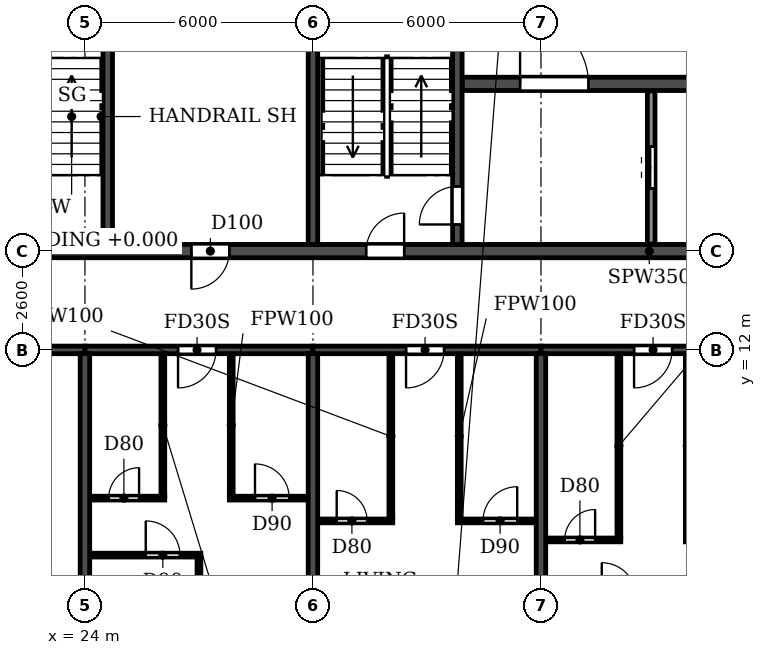
"""IFC4 building model, lengths in metres.
Left out: names, types, materials, properties, quantities, classifications, styles, units other than length and angle.
Written with IfcOpenShell. Run it as: python <this file> out.ifc"""

import sys

from ifc_helpers import new_model, si_unit, direction, frame, frame_2d, origin, place, context, subcontext, project, spatial, rectangle, extrude, element, fill, save


model = new_model("IFC4")
c1 = context("Model", 3, precision=1e-05, world=origin(), true_north=direction((0.0, 1.0)))
c2 = subcontext(c1, "Body", "Model", "MODEL_VIEW")
j1 = project(units=[si_unit("LENGTHUNIT", "METRE"), si_unit("PLANEANGLEUNIT", "RADIAN")], contexts=[c1])
p1 = place(None, origin())
s1 = spatial("IfcSite", under=j1, at=p1, CompositionType="ELEMENT")
p2 = place(p1, origin())
s2 = spatial("IfcBuilding", under=s1, at=p2, CompositionType="ELEMENT")
p3 = place(p2, frame((0.0, 0.0, 221.4)))
s3 = spatial("IfcBuildingStorey", under=s2, at=p3, CompositionType="ELEMENT", Elevation=221.4)
for number, where, z_axis, x_axis in (
    (1, (24.0, 0.2, 0.0), (0.0, 0.0, 1.0), (0.0, 1.0, 0.0)),
    (2, (30.0, 0.2, 0.0), (0.0, 0.0, 1.0), (0.0, 1.0, 0.0)),
    (3, (36.0, 0.2, 0.0), (0.0, 0.0, 1.0), (0.0, 1.0, 0.0)),
):
    element("IfcWall", number, at=place(p3, frame(where, z_axis=z_axis, x_axis=x_axis)), inside=s3, PredefinedType="SHEAR", context=c2, shape_type="SweptSolid", body=[
        extrude(rectangle(XDim=11.7, YDim=0.25, at=frame_2d((5.85, 0.0))), origin(), (0.0, 0.0, 1.0), 3.08),
    ])
p4 = place(p3, frame((18.2, 12.0, 0.0), z_axis=(0.0, 0.0, 1.0), x_axis=(1.0, 0.0, 0.0)))
e4 = element("IfcWall", 4, at=p4, inside=s3, PredefinedType="SHEAR", context=c2, shape_type="SweptSolid", body=[
    extrude(rectangle(XDim=5.8, YDim=0.2, at=frame_2d((2.9, 0.0))), origin(), (0.0, 0.0, 1.0), 2.48),
])
p5 = place(p4, frame((2.3, 0.0, 0.0)))
e5 = element("IfcOpeningElement", 5, at=p5, cuts=e4, PredefinedType="OPENING", context=c2, shape_type="SweptSolid", body=[
    extrude(rectangle(XDim=1.0, YDim=2.1, at=frame_2d((0.5, 1.05))), frame((0.0, 0.11, 0.0), z_axis=(0.0, -1.0, 0.0), x_axis=(1.0, 0.0, 0.0)), (0.0, 0.0, 1.0), 0.22),
])
p6 = place(p3, frame((24.0, 12.0, 0.0), z_axis=(0.0, 0.0, 1.0), x_axis=(1.0, 0.0, 0.0)))
e6 = element("IfcWall", 6, at=p6, inside=s3, PredefinedType="SHEAR", context=c2, shape_type="SweptSolid", body=[
    extrude(rectangle(XDim=6.0, YDim=0.2, at=frame_2d((3.0, 0.0))), origin(), (0.0, 0.0, 1.0), 2.48),
])
p7 = place(p6, frame((2.45, 0.0, 0.0)))
e7 = element("IfcOpeningElement", 7, at=p7, cuts=e6, PredefinedType="OPENING", context=c2, shape_type="SweptSolid", body=[
    extrude(rectangle(XDim=1.0, YDim=2.1, at=frame_2d((0.5, 1.05))), frame((0.0, 0.11, 0.0), z_axis=(0.0, -1.0, 0.0), x_axis=(1.0, 0.0, 0.0)), (0.0, 0.0, 1.0), 0.22),
])
p8 = place(p3, frame((30.0, 12.0, 0.0), z_axis=(0.0, 0.0, 1.0), x_axis=(1.0, 0.0, 0.0)))
e8 = element("IfcWall", 8, at=p8, inside=s3, PredefinedType="SHEAR", context=c2, shape_type="SweptSolid", body=[
    extrude(rectangle(XDim=6.0, YDim=0.2, at=frame_2d((3.0, 0.0))), origin(), (0.0, 0.0, 1.0), 2.48),
])
p9 = place(p8, frame((2.45, 0.0, 0.0)))
e9 = element("IfcOpeningElement", 9, at=p9, cuts=e8, PredefinedType="OPENING", context=c2, shape_type="SweptSolid", body=[
    extrude(rectangle(XDim=1.0, YDim=2.1, at=frame_2d((0.5, 1.05))), frame((0.0, 0.11, 0.0), z_axis=(0.0, -1.0, 0.0), x_axis=(1.0, 0.0, 0.0)), (0.0, 0.0, 1.0), 0.22),
])
p10 = place(p3, frame((36.0, 12.0, 0.0), z_axis=(0.0, 0.0, 1.0), x_axis=(1.0, 0.0, 0.0)))
e10 = element("IfcWall", 10, at=p10, inside=s3, PredefinedType="SHEAR", context=c2, shape_type="SweptSolid", body=[
    extrude(rectangle(XDim=6.0, YDim=0.2, at=frame_2d((3.0, 0.0))), origin(), (0.0, 0.0, 1.0), 2.48),
])
p11 = place(p10, frame((2.45, 0.0, 0.0)))
e11 = element("IfcOpeningElement", 11, at=p11, cuts=e10, PredefinedType="OPENING", context=c2, shape_type="SweptSolid", body=[
    extrude(rectangle(XDim=1.0, YDim=2.1, at=frame_2d((0.5, 1.05))), frame((0.0, 0.11, 0.0), z_axis=(0.0, -1.0, 0.0), x_axis=(1.0, 0.0, 0.0)), (0.0, 0.0, 1.0), 0.22),
])
p12 = place(p3, frame((18.2, 14.6, 0.0), z_axis=(0.0, 0.0, 1.0), x_axis=(1.0, 0.0, 0.0)))
e12 = element("IfcWall", 12, at=p12, inside=s3, PredefinedType="SOLIDWALL", context=c2, shape_type="SweptSolid", body=[
    extrude(rectangle(XDim=65.6, YDim=0.35, at=frame_2d((32.8, 0.0))), origin(), (0.0, 0.0, 1.0), 3.08),
])
p13 = place(p12, frame((0.7, 0.0, 0.0)))
e13 = element("IfcOpeningElement", 13, at=p13, cuts=e12, PredefinedType="OPENING", context=c2, shape_type="SweptSolid", body=[
    extrude(rectangle(XDim=1.0, YDim=2.1, at=frame_2d((0.5, 1.05))), frame((0.0, 0.185, 0.0), z_axis=(0.0, -1.0, 0.0), x_axis=(1.0, 0.0, 0.0)), (0.0, 0.0, 1.0), 0.37),
])
p14 = place(p12, frame((8.6, 0.0, 0.0)))
e14 = element("IfcOpeningElement", 14, at=p14, cuts=e12, PredefinedType="OPENING", context=c2, shape_type="SweptSolid", body=[
    extrude(rectangle(XDim=1.0, YDim=2.1, at=frame_2d((0.5, 1.05))), frame((0.0, 0.185, 0.0), z_axis=(0.0, -1.0, 0.0), x_axis=(1.0, 0.0, 0.0)), (0.0, 0.0, 1.0), 0.37),
])
p15 = place(p12, frame((13.2, 0.0, 0.0)))
e15 = element("IfcOpeningElement", 15, at=p15, cuts=e12, PredefinedType="OPENING", context=c2, shape_type="SweptSolid", body=[
    extrude(rectangle(XDim=1.0, YDim=2.1, at=frame_2d((0.5, 1.05))), frame((0.0, 0.185, 0.0), z_axis=(0.0, -1.0, 0.0), x_axis=(1.0, 0.0, 0.0)), (0.0, 0.0, 1.0), 0.37),
])
p16 = place(p12, frame((27.1, 0.0, 0.0)))
e16 = element("IfcOpeningElement", 16, at=p16, cuts=e12, PredefinedType="OPENING", context=c2, shape_type="SweptSolid", body=[
    extrude(rectangle(XDim=1.0, YDim=2.1, at=frame_2d((0.5, 1.05))), frame((0.0, 0.185, 0.0), z_axis=(0.0, -1.0, 0.0), x_axis=(1.0, 0.0, 0.0)), (0.0, 0.0, 1.0), 0.37),
])
p17 = place(p12, frame((32.3, 0.0, 0.0)))
e17 = element("IfcOpeningElement", 17, at=p17, cuts=e12, PredefinedType="OPENING", context=c2, shape_type="SweptSolid", body=[
    extrude(rectangle(XDim=1.0, YDim=2.1, at=frame_2d((0.5, 1.05))), frame((0.0, 0.185, 0.0), z_axis=(0.0, -1.0, 0.0), x_axis=(1.0, 0.0, 0.0)), (0.0, 0.0, 1.0), 0.37),
])
p18 = place(p12, frame((35.95, 0.0, 0.0)))
e18 = element("IfcOpeningElement", 18, at=p18, cuts=e12, PredefinedType="OPENING", context=c2, shape_type="SweptSolid", body=[
    extrude(rectangle(XDim=1.5, YDim=2.1, at=frame_2d((0.75, 1.05))), frame((0.0, 0.185, 0.0), z_axis=(0.0, -1.0, 0.0), x_axis=(1.0, 0.0, 0.0)), (0.0, 0.0, 1.0), 0.37),
])
p19 = place(p12, frame((40.1, 0.0, 0.0)))
e19 = element("IfcOpeningElement", 19, at=p19, cuts=e12, PredefinedType="OPENING", context=c2, shape_type="SweptSolid", body=[
    extrude(rectangle(XDim=1.0, YDim=2.1, at=frame_2d((0.5, 1.05))), frame((0.0, 0.185, 0.0), z_axis=(0.0, -1.0, 0.0), x_axis=(1.0, 0.0, 0.0)), (0.0, 0.0, 1.0), 0.37),
])
p20 = place(p12, frame((51.4, 0.0, 0.0)))
e20 = element("IfcOpeningElement", 20, at=p20, cuts=e12, PredefinedType="OPENING", context=c2, shape_type="SweptSolid", body=[
    extrude(rectangle(XDim=1.0, YDim=2.1, at=frame_2d((0.5, 1.05))), frame((0.0, 0.185, 0.0), z_axis=(0.0, -1.0, 0.0), x_axis=(1.0, 0.0, 0.0)), (0.0, 0.0, 1.0), 0.37),
])
p21 = place(p12, frame((56.0, 0.0, 0.0)))
e21 = element("IfcOpeningElement", 21, at=p21, cuts=e12, PredefinedType="OPENING", context=c2, shape_type="SweptSolid", body=[
    extrude(rectangle(XDim=1.0, YDim=2.1, at=frame_2d((0.5, 1.05))), frame((0.0, 0.185, 0.0), z_axis=(0.0, -1.0, 0.0), x_axis=(1.0, 0.0, 0.0)), (0.0, 0.0, 1.0), 0.37),
])
p22 = place(p12, frame((63.9, 0.0, 0.0)))
e22 = element("IfcOpeningElement", 22, at=p22, cuts=e12, PredefinedType="OPENING", context=c2, shape_type="SweptSolid", body=[
    extrude(rectangle(XDim=1.0, YDim=2.1, at=frame_2d((0.5, 1.05))), frame((0.0, 0.185, 0.0), z_axis=(0.0, -1.0, 0.0), x_axis=(1.0, 0.0, 0.0)), (0.0, 0.0, 1.0), 0.37),
])
p23 = place(p3, frame((33.925, 19.0, 0.0), z_axis=(0.0, 0.0, 1.0), x_axis=(1.0, 0.0, 0.0)))
e23 = element("IfcWall", 23, at=p23, inside=s3, PredefinedType="SOLIDWALL", context=c2, shape_type="SweptSolid", body=[
    extrude(rectangle(XDim=34.15, YDim=0.35, at=frame_2d((17.075, 0.0))), origin(), (0.0, 0.0, 1.0), 3.08),
])
p24 = place(p23, frame((16.175, 0.0, 0.0)))
e24 = element("IfcOpeningElement", 24, at=p24, cuts=e23, PredefinedType="OPENING", context=c2, shape_type="SweptSolid", body=[
    extrude(rectangle(XDim=1.8, YDim=2.1, at=frame_2d((0.9, 1.05))), frame((0.0, 0.185, 0.0), z_axis=(0.0, -1.0, 0.0), x_axis=(1.0, 0.0, 0.0)), (0.0, 0.0, 1.0), 0.37),
])
p25 = place(p23, frame((1.525, 0.0, 0.0)))
e25 = element("IfcOpeningElement", 25, at=p25, cuts=e23, PredefinedType="OPENING", context=c2, shape_type="SweptSolid", body=[
    extrude(rectangle(XDim=1.8, YDim=2.1, at=frame_2d((0.9, 1.05))), frame((0.0, 0.185, 0.0), z_axis=(0.0, -1.0, 0.0), x_axis=(1.0, 0.0, 0.0)), (0.0, 0.0, 1.0), 0.37),
])
p26 = place(p23, frame((30.825, 0.0, 0.0)))
e26 = element("IfcOpeningElement", 26, at=p26, cuts=e23, PredefinedType="OPENING", context=c2, shape_type="SweptSolid", body=[
    extrude(rectangle(XDim=1.8, YDim=2.1, at=frame_2d((0.9, 1.05))), frame((0.0, 0.185, 0.0), z_axis=(0.0, -1.0, 0.0), x_axis=(1.0, 0.0, 0.0)), (0.0, 0.0, 1.0), 0.37),
])
p27 = place(p3, frame((30.0, 14.775, 0.0), z_axis=(0.0, 0.0, 1.0), x_axis=(0.0, 1.0, 0.0)))
e27 = element("IfcWall", 27, at=p27, inside=s3, PredefinedType="SOLIDWALL", context=c2, shape_type="SweptSolid", body=[
    extrude(rectangle(XDim=7.7, YDim=0.25, at=frame_2d((3.85, 0.0))), origin(), (0.0, 0.0, 1.0), 3.08),
])
p28 = place(p3, frame((33.8, 14.775, 0.0), z_axis=(0.0, 0.0, 1.0), x_axis=(0.0, 1.0, 0.0)))
e28 = element("IfcWall", 28, at=p28, inside=s3, PredefinedType="SOLIDWALL", context=c2, shape_type="SweptSolid", body=[
    extrude(rectangle(XDim=7.7, YDim=0.25, at=frame_2d((3.85, 0.0))), origin(), (0.0, 0.0, 1.0), 3.08),
])
p29 = place(p28, frame((0.525, 0.0, 0.0)))
e29 = element("IfcOpeningElement", 29, at=p29, cuts=e28, PredefinedType="OPENING", context=c2, shape_type="SweptSolid", body=[
    extrude(rectangle(XDim=1.0, YDim=2.1, at=frame_2d((0.5, 1.05))), frame((0.0, 0.135, 0.0), z_axis=(0.0, -1.0, 0.0), x_axis=(1.0, 0.0, 0.0)), (0.0, 0.0, 1.0), 0.27),
])
p30 = place(p3, frame((24.6, 14.775, 0.0), z_axis=(0.0, 0.0, 1.0), x_axis=(0.0, 1.0, 0.0)))
e30 = element("IfcWall", 30, at=p30, inside=s3, PredefinedType="SOLIDWALL", context=c2, shape_type="SweptSolid", body=[
    extrude(rectangle(XDim=7.7, YDim=0.25, at=frame_2d((3.85, 0.0))), origin(), (0.0, 0.0, 1.0), 3.08),
])
p31 = place(p3, frame((24.135, 6.6, 0.0), z_axis=(0.0, 0.0, 1.0), x_axis=(1.0, 0.0, 0.0)))
e31 = element("IfcWall", 31, at=p31, inside=s3, PredefinedType="PARTITIONING", context=c2, shape_type="SweptSolid", body=[
    extrude(rectangle(XDim=2.915, YDim=0.1, at=frame_2d((1.458, 0.0))), origin(), (0.0, 0.0, 1.0), 3.08),
])
p32 = place(p31, frame((1.465, 0.0, 0.0)))
e32 = element("IfcOpeningElement", 32, at=p32, cuts=e31, PredefinedType="OPENING", context=c2, shape_type="SweptSolid", body=[
    extrude(rectangle(XDim=0.9, YDim=2.1, at=frame_2d((0.45, 1.05))), frame((0.0, 0.06, 0.0), z_axis=(0.0, -1.0, 0.0), x_axis=(1.0, 0.0, 0.0)), (0.0, 0.0, 1.0), 0.12),
])
p33 = place(p3, frame((36.135, 7.0, 0.0), z_axis=(0.0, 0.0, 1.0), x_axis=(1.0, 0.0, 0.0)))
e33 = element("IfcWall", 33, at=p33, inside=s3, PredefinedType="PARTITIONING", context=c2, shape_type="SweptSolid", body=[
    extrude(rectangle(XDim=1.965, YDim=0.1, at=frame_2d((0.982, 0.0))), origin(), (0.0, 0.0, 1.0), 3.08),
])
p34 = place(p33, frame((0.49, 0.0, 0.0)))
e34 = element("IfcOpeningElement", 34, at=p34, cuts=e33, PredefinedType="OPENING", context=c2, shape_type="SweptSolid", body=[
    extrude(rectangle(XDim=0.8, YDim=2.1, at=frame_2d((0.4, 1.05))), frame((0.0, 0.06, 0.0), z_axis=(0.0, -1.0, 0.0), x_axis=(1.0, 0.0, 0.0)), (0.0, 0.0, 1.0), 0.12),
])
p35 = place(p3, frame((30.135, 7.5, 0.0), z_axis=(0.0, 0.0, 1.0), x_axis=(1.0, 0.0, 0.0)))
e35 = element("IfcWall", 35, at=p35, inside=s3, PredefinedType="PARTITIONING", context=c2, shape_type="SweptSolid", body=[
    extrude(rectangle(XDim=1.965, YDim=0.1, at=frame_2d((0.982, 0.0))), origin(), (0.0, 0.0, 1.0), 3.08),
])
p36 = place(p35, frame((0.49, 0.0, 0.0)))
e36 = element("IfcOpeningElement", 36, at=p36, cuts=e35, PredefinedType="OPENING", context=c2, shape_type="SweptSolid", body=[
    extrude(rectangle(XDim=0.8, YDim=2.1, at=frame_2d((0.4, 1.05))), frame((0.0, 0.06, 0.0), z_axis=(0.0, -1.0, 0.0), x_axis=(1.0, 0.0, 0.0)), (0.0, 0.0, 1.0), 0.12),
])
p37 = place(p3, frame((33.8, 7.5, 0.0), z_axis=(0.0, 0.0, 1.0), x_axis=(1.0, 0.0, 0.0)))
e37 = element("IfcWall", 37, at=p37, inside=s3, PredefinedType="PARTITIONING", context=c2, shape_type="SweptSolid", body=[
    extrude(rectangle(XDim=2.065, YDim=0.1, at=frame_2d((1.032, 0.0))), origin(), (0.0, 0.0, 1.0), 3.08),
])
p38 = place(p37, frame((0.675, 0.0, 0.0)))
e38 = element("IfcOpeningElement", 38, at=p38, cuts=e37, PredefinedType="OPENING", context=c2, shape_type="SweptSolid", body=[
    extrude(rectangle(XDim=0.9, YDim=2.1, at=frame_2d((0.45, 1.05))), frame((0.0, 0.06, 0.0), z_axis=(0.0, -1.0, 0.0), x_axis=(1.0, 0.0, 0.0)), (0.0, 0.0, 1.0), 0.12),
])
p39 = place(p3, frame((24.135, 8.1, 0.0), z_axis=(0.0, 0.0, 1.0), x_axis=(1.0, 0.0, 0.0)))
e39 = element("IfcWall", 39, at=p39, inside=s3, PredefinedType="PARTITIONING", context=c2, shape_type="SweptSolid", body=[
    extrude(rectangle(XDim=1.965, YDim=0.1, at=frame_2d((0.982, 0.0))), origin(), (0.0, 0.0, 1.0), 3.08),
])
p40 = place(p39, frame((0.49, 0.0, 0.0)))
e40 = element("IfcOpeningElement", 40, at=p40, cuts=e39, PredefinedType="OPENING", context=c2, shape_type="SweptSolid", body=[
    extrude(rectangle(XDim=0.8, YDim=2.1, at=frame_2d((0.4, 1.05))), frame((0.0, 0.06, 0.0), z_axis=(0.0, -1.0, 0.0), x_axis=(1.0, 0.0, 0.0)), (0.0, 0.0, 1.0), 0.12),
])
p41 = place(p3, frame((27.8, 8.1, 0.0), z_axis=(0.0, 0.0, 1.0), x_axis=(1.0, 0.0, 0.0)))
e41 = element("IfcWall", 41, at=p41, inside=s3, PredefinedType="PARTITIONING", context=c2, shape_type="SweptSolid", body=[
    extrude(rectangle(XDim=2.065, YDim=0.1, at=frame_2d((1.032, 0.0))), origin(), (0.0, 0.0, 1.0), 3.08),
])
p42 = place(p41, frame((0.675, 0.0, 0.0)))
e42 = element("IfcOpeningElement", 42, at=p42, cuts=e41, PredefinedType="OPENING", context=c2, shape_type="SweptSolid", body=[
    extrude(rectangle(XDim=0.9, YDim=2.1, at=frame_2d((0.45, 1.05))), frame((0.0, 0.06, 0.0), z_axis=(0.0, -1.0, 0.0), x_axis=(1.0, 0.0, 0.0)), (0.0, 0.0, 1.0), 0.12),
])
p43 = place(p3, frame((26.05, 8.15, 0.0), z_axis=(0.0, 0.0, 1.0), x_axis=(0.0, 1.0, 0.0)))
e43 = element("IfcWall", 43, at=p43, inside=s3, PredefinedType="PARTITIONING", context=c2, shape_type="SweptSolid", body=[
    extrude(rectangle(XDim=3.74, YDim=0.1, at=frame_2d((1.87, 0.0))), origin(), (0.0, 0.0, 1.0), 3.08),
])
p44 = place(p3, frame((27.0, 0.06, 0.0), z_axis=(0.0, 0.0, 1.0), x_axis=(0.0, 1.0, 0.0)))
e44 = element("IfcWall", 44, at=p44, inside=s3, PredefinedType="PARTITIONING", context=c2, shape_type="SweptSolid", body=[
    extrude(rectangle(XDim=6.49, YDim=0.1, at=frame_2d((3.245, 0.0))), origin(), (0.0, 0.0, 1.0), 3.08),
])
p45 = place(p3, frame((27.85, 8.15, 0.0), z_axis=(0.0, 0.0, 1.0), x_axis=(0.0, 1.0, 0.0)))
e45 = element("IfcWall", 45, at=p45, inside=s3, PredefinedType="PARTITIONING", context=c2, shape_type="SweptSolid", body=[
    extrude(rectangle(XDim=3.74, YDim=0.1, at=frame_2d((1.87, 0.0))), origin(), (0.0, 0.0, 1.0), 3.08),
])
for number, where, z_axis, x_axis in (
    (46, (32.05, 7.55, 0.0), (0.0, 0.0, 1.0), (0.0, 1.0, 0.0)),
    (47, (33.85, 7.55, 0.0), (0.0, 0.0, 1.0), (0.0, 1.0, 0.0)),
):
    element("IfcWall", number, at=place(p3, frame(where, z_axis=z_axis, x_axis=x_axis)), inside=s3, PredefinedType="PARTITIONING", context=c2, shape_type="SweptSolid", body=[
        extrude(rectangle(XDim=4.34, YDim=0.1, at=frame_2d((2.17, 0.0))), origin(), (0.0, 0.0, 1.0), 3.08),
    ])
p46 = place(p3, frame((38.05, 7.05, 0.0), z_axis=(0.0, 0.0, 1.0), x_axis=(0.0, 1.0, 0.0)))
e48 = element("IfcWall", 48, at=p46, inside=s3, PredefinedType="PARTITIONING", context=c2, shape_type="SweptSolid", body=[
    extrude(rectangle(XDim=4.84, YDim=0.1, at=frame_2d((2.42, 0.0))), origin(), (0.0, 0.0, 1.0), 3.08),
])
p47 = place(p3, frame((38.9, 14.785, 0.0), z_axis=(0.0, 0.0, 1.0), x_axis=(0.0, 1.0, 0.0)))
e49 = element("IfcWall", 49, at=p47, inside=s3, PredefinedType="PARTITIONING", context=c2, shape_type="SweptSolid", body=[
    extrude(rectangle(XDim=4.03, YDim=0.2, at=frame_2d((2.015, 0.0))), origin(), (0.0, 0.0, 1.0), 3.08),
])
p48 = place(p47, frame((1.465, 0.0, 0.0)))
e50 = element("IfcOpeningElement", 50, at=p48, cuts=e49, PredefinedType="OPENING", context=c2, shape_type="SweptSolid", body=[
    extrude(rectangle(XDim=1.1, YDim=2.1, at=frame_2d((0.55, 1.05))), frame((0.0, 0.11, 0.0), z_axis=(0.0, -1.0, 0.0), x_axis=(1.0, 0.0, 0.0)), (0.0, 0.0, 1.0), 0.22),
])
p49 = place(p14, frame((1.0, 0.0, 0.0), z_axis=(0.0, 0.0, 1.0), x_axis=(-1.0, 0.0, 0.0)))
e51 = element("IfcDoor", 51, at=p49, inside=s3, OperationType="SINGLE_SWING_RIGHT", PredefinedType="DOOR", context=c2, shape_type="SweptSolid", body=[
    extrude(rectangle(XDim=1.0, YDim=2.1, at=frame_2d((0.5, 1.05))), frame((0.0, 0.025, 0.0), z_axis=(0.0, -1.0, 0.0), x_axis=(1.0, 0.0, 0.0)), (0.0, 0.0, 1.0), 0.05),
])
fill(e14, e51)
p50 = place(p15, origin())
e52 = element("IfcDoor", 52, at=p50, inside=s3, OperationType="SINGLE_SWING_RIGHT", PredefinedType="DOOR", context=c2, shape_type="SweptSolid", body=[
    extrude(rectangle(XDim=1.0, YDim=2.1, at=frame_2d((0.5, 1.05))), frame((0.0, 0.025, 0.0), z_axis=(0.0, -1.0, 0.0), x_axis=(1.0, 0.0, 0.0)), (0.0, 0.0, 1.0), 0.05),
])
fill(e15, e52)
p51 = place(p40, origin())
e53 = element("IfcDoor", 53, at=p51, inside=s3, OperationType="SINGLE_SWING_RIGHT", PredefinedType="DOOR", context=c2, shape_type="SweptSolid", body=[
    extrude(rectangle(XDim=0.8, YDim=2.1, at=frame_2d((0.4, 1.05))), frame((0.0, 0.025, 0.0), z_axis=(0.0, -1.0, 0.0), x_axis=(1.0, 0.0, 0.0)), (0.0, 0.0, 1.0), 0.05),
])
fill(e40, e53)
p52 = place(p32, origin())
e54 = element("IfcDoor", 54, at=p52, inside=s3, OperationType="SINGLE_SWING_LEFT", PredefinedType="DOOR", context=c2, shape_type="SweptSolid", body=[
    extrude(rectangle(XDim=0.9, YDim=2.1, at=frame_2d((0.45, 1.05))), frame((0.0, 0.025, 0.0), z_axis=(0.0, -1.0, 0.0), x_axis=(1.0, 0.0, 0.0)), (0.0, 0.0, 1.0), 0.05),
])
fill(e32, e54)
p53 = place(p7, frame((1.0, 0.0, 0.0), z_axis=(0.0, 0.0, 1.0), x_axis=(-1.0, 0.0, 0.0)))
e55 = element("IfcDoor", 55, at=p53, inside=s3, OperationType="SINGLE_SWING_RIGHT", PredefinedType="DOOR", context=c2, shape_type="SweptSolid", body=[
    extrude(rectangle(XDim=1.0, YDim=2.1, at=frame_2d((0.5, 1.05))), frame((0.0, 0.025, 0.0), z_axis=(0.0, -1.0, 0.0), x_axis=(1.0, 0.0, 0.0)), (0.0, 0.0, 1.0), 0.05),
])
fill(e7, e55)
p54 = place(p42, origin())
e56 = element("IfcDoor", 56, at=p54, inside=s3, OperationType="SINGLE_SWING_LEFT", PredefinedType="DOOR", context=c2, shape_type="SweptSolid", body=[
    extrude(rectangle(XDim=0.9, YDim=2.1, at=frame_2d((0.45, 1.05))), frame((0.0, 0.025, 0.0), z_axis=(0.0, -1.0, 0.0), x_axis=(1.0, 0.0, 0.0)), (0.0, 0.0, 1.0), 0.05),
])
fill(e42, e56)
p55 = place(p36, origin())
e57 = element("IfcDoor", 57, at=p55, inside=s3, OperationType="SINGLE_SWING_LEFT", PredefinedType="DOOR", context=c2, shape_type="SweptSolid", body=[
    extrude(rectangle(XDim=0.8, YDim=2.1, at=frame_2d((0.4, 1.05))), frame((0.0, 0.025, 0.0), z_axis=(0.0, -1.0, 0.0), x_axis=(1.0, 0.0, 0.0)), (0.0, 0.0, 1.0), 0.05),
])
fill(e36, e57)
p56 = place(p9, frame((1.0, 0.0, 0.0), z_axis=(0.0, 0.0, 1.0), x_axis=(-1.0, 0.0, 0.0)))
e58 = element("IfcDoor", 58, at=p56, inside=s3, OperationType="SINGLE_SWING_RIGHT", PredefinedType="DOOR", context=c2, shape_type="SweptSolid", body=[
    extrude(rectangle(XDim=1.0, YDim=2.1, at=frame_2d((0.5, 1.05))), frame((0.0, 0.025, 0.0), z_axis=(0.0, -1.0, 0.0), x_axis=(1.0, 0.0, 0.0)), (0.0, 0.0, 1.0), 0.05),
])
fill(e9, e58)
p57 = place(p38, origin())
e59 = element("IfcDoor", 59, at=p57, inside=s3, OperationType="SINGLE_SWING_RIGHT", PredefinedType="DOOR", context=c2, shape_type="SweptSolid", body=[
    extrude(rectangle(XDim=0.9, YDim=2.1, at=frame_2d((0.45, 1.05))), frame((0.0, 0.025, 0.0), z_axis=(0.0, -1.0, 0.0), x_axis=(1.0, 0.0, 0.0)), (0.0, 0.0, 1.0), 0.05),
])
fill(e38, e59)
p58 = place(p34, origin())
e60 = element("IfcDoor", 60, at=p58, inside=s3, OperationType="SINGLE_SWING_RIGHT", PredefinedType="DOOR", context=c2, shape_type="SweptSolid", body=[
    extrude(rectangle(XDim=0.8, YDim=2.1, at=frame_2d((0.4, 1.05))), frame((0.0, 0.025, 0.0), z_axis=(0.0, -1.0, 0.0), x_axis=(1.0, 0.0, 0.0)), (0.0, 0.0, 1.0), 0.05),
])
fill(e34, e60)
p59 = place(p11, frame((1.0, 0.0, 0.0), z_axis=(0.0, 0.0, 1.0), x_axis=(-1.0, 0.0, 0.0)))
e61 = element("IfcDoor", 61, at=p59, inside=s3, OperationType="SINGLE_SWING_RIGHT", PredefinedType="DOOR", context=c2, shape_type="SweptSolid", body=[
    extrude(rectangle(XDim=1.0, YDim=2.1, at=frame_2d((0.5, 1.05))), frame((0.0, 0.025, 0.0), z_axis=(0.0, -1.0, 0.0), x_axis=(1.0, 0.0, 0.0)), (0.0, 0.0, 1.0), 0.05),
])
fill(e11, e61)
p60 = place(p29, origin())
e62 = element("IfcDoor", 62, at=p60, inside=s3, OperationType="SINGLE_SWING_LEFT", PredefinedType="DOOR", context=c2, shape_type="SweptSolid", body=[
    extrude(rectangle(XDim=1.0, YDim=2.1, at=frame_2d((0.5, 1.05))), frame((0.0, 0.025, 0.0), z_axis=(0.0, -1.0, 0.0), x_axis=(1.0, 0.0, 0.0)), (0.0, 0.0, 1.0), 0.05),
])
fill(e29, e62)
p61 = place(p48, origin())
e63 = element("IfcDoor", 63, at=p61, inside=s3, OperationType="DOUBLE_DOOR_SLIDING", PredefinedType="DOOR", context=c2, shape_type="SweptSolid", body=[
    extrude(rectangle(XDim=1.1, YDim=2.1, at=frame_2d((0.55, 1.05))), frame((0.0, 0.025, 0.0), z_axis=(0.0, -1.0, 0.0), x_axis=(1.0, 0.0, 0.0)), (0.0, 0.0, 1.0), 0.05),
])
fill(e50, e63)
p62 = place(p25, origin())
e64 = element("IfcDoor", 64, at=p62, inside=s3, OperationType="DOUBLE_DOOR_SINGLE_SWING", PredefinedType="DOOR", context=c2, shape_type="SweptSolid", body=[
    extrude(rectangle(XDim=1.8, YDim=2.1, at=frame_2d((0.9, 1.05))), frame((0.0, 0.025, 0.0), z_axis=(0.0, -1.0, 0.0), x_axis=(1.0, 0.0, 0.0)), (0.0, 0.0, 1.0), 0.05),
])
fill(e25, e64)
save(model, sys.argv[1])
